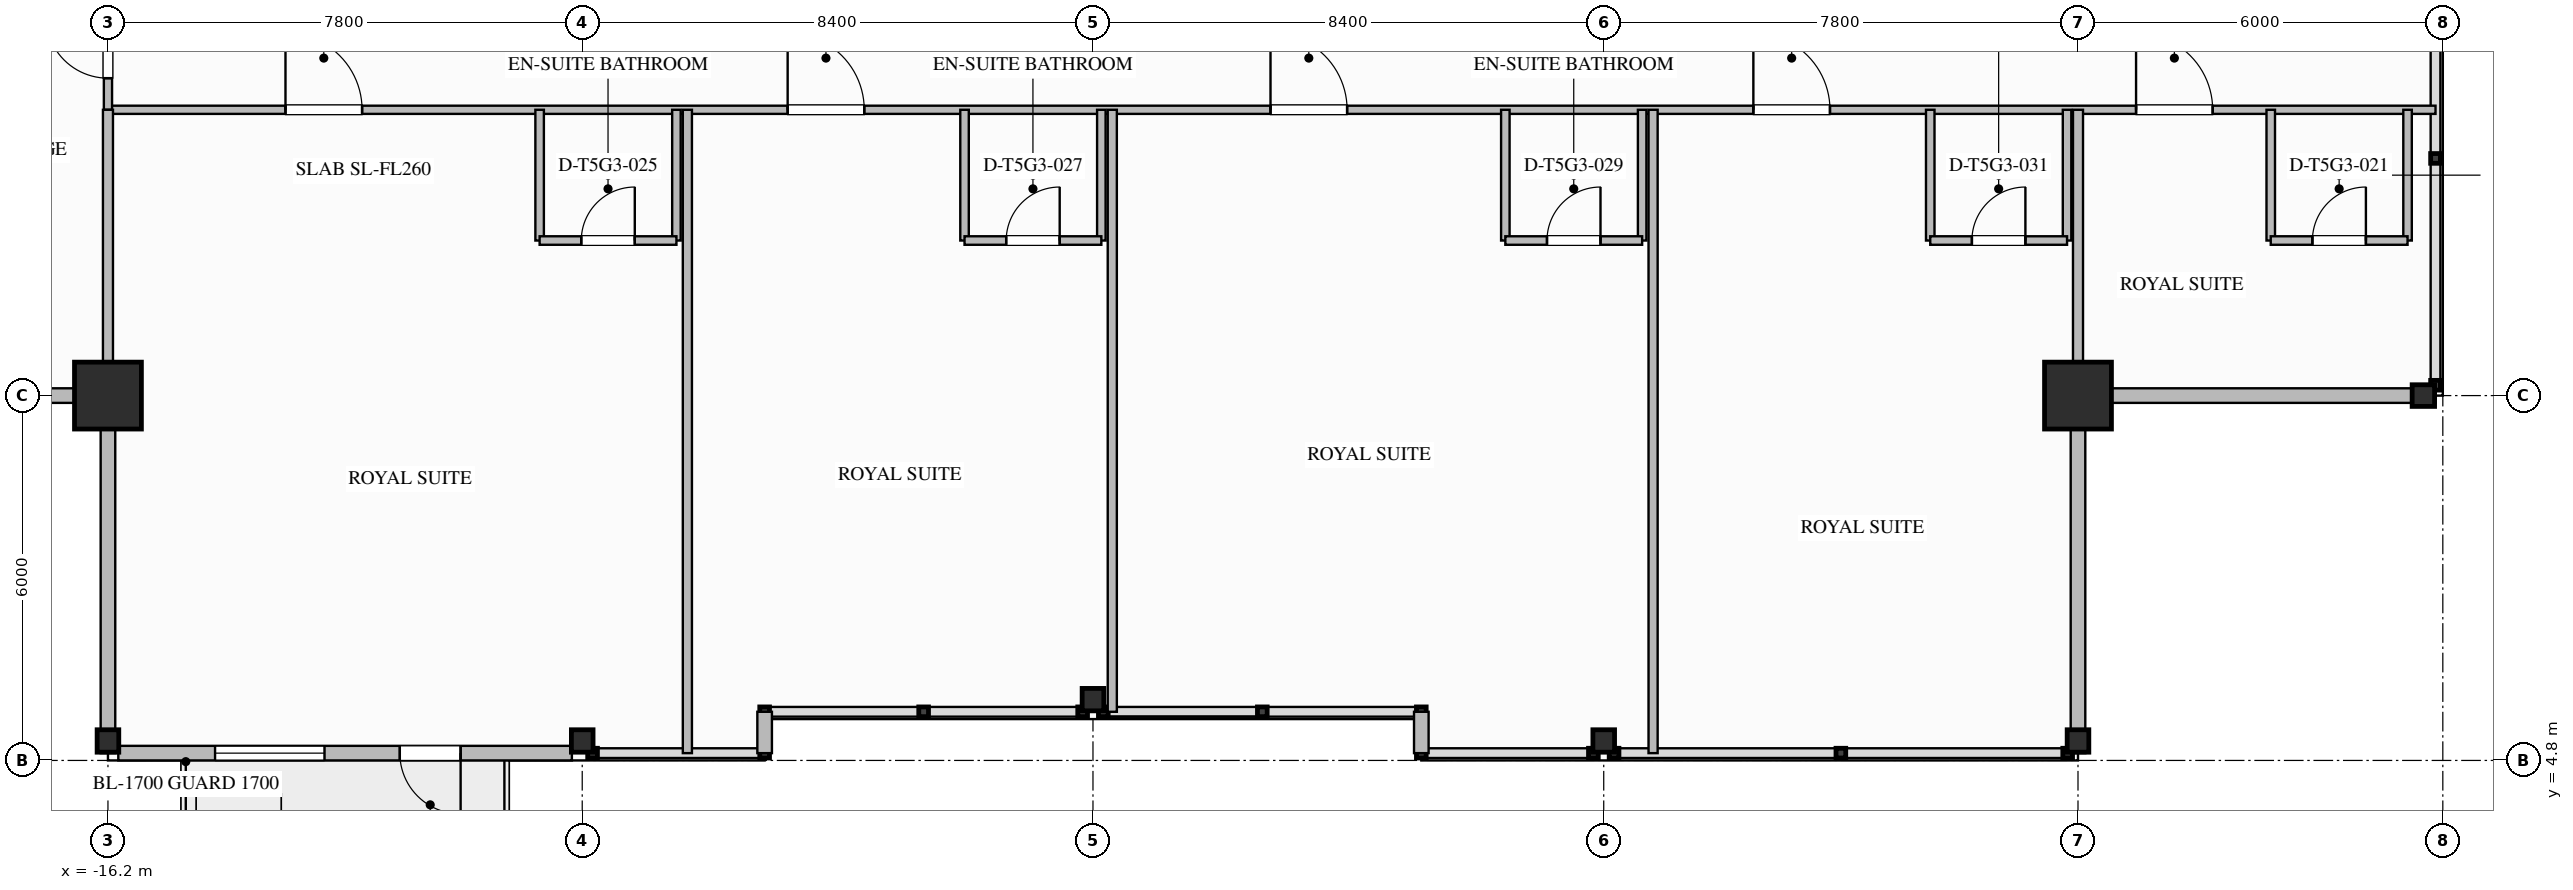
"""IFC4 building model, lengths in metres.
Left out: names, types, materials, properties, quantities, classifications, styles, units other than length and angle.
Written with IfcOpenShell. Run it as: python <this file> out.ifc"""

import sys

from ifc_helpers import new_model, si_unit, direction, frame, frame_2d, origin, origin_2d, place, context, subcontext, project, spatial, rectangle, i_section, extrude, element, fill, save


model = new_model("IFC4")
c1 = context("Model", 3, precision=1e-05, world=origin(), true_north=direction((0.0, 1.0)))
c2 = subcontext(c1, "Body", "Model", "MODEL_VIEW")
j1 = project(units=[si_unit("LENGTHUNIT", "METRE"), si_unit("PLANEANGLEUNIT", "RADIAN")], contexts=[c1])
p1 = place(None, origin())
s1 = spatial("IfcSite", under=j1, at=p1, CompositionType="ELEMENT")
p2 = place(p1, origin())
s2 = spatial("IfcBuilding", under=s1, at=p2, CompositionType="ELEMENT")
p3 = place(p2, frame((0.0, 0.0, 286.9)))
s3 = spatial("IfcBuildingStorey", under=s2, at=p3, CompositionType="ELEMENT", Elevation=286.9)
for number, where, z_axis, x_axis in (
    (1, (-16.2, 10.8, 0.0), (0.0, 0.0, 1.0), (1.0, 0.0, 0.0)),
    (2, (16.2, 10.8, 0.0), (0.0, 0.0, 1.0), (1.0, 0.0, 0.0)),
):
    element("IfcColumn", number, at=place(p3, frame(where, z_axis=z_axis, x_axis=x_axis)), inside=s3, PredefinedType="COLUMN", context=c2, shape_type="SweptSolid", body=[
        extrude(rectangle(XDim=1.1, YDim=1.1, at=origin_2d()), origin(), (0.0, 0.0, 1.0), 3.65),
    ])
for number, where, z_axis, x_axis in (
    (3, (21.88, 10.8, 0.0), (0.0, 0.0, 1.0), (1.0, 0.0, 0.0)),
    (4, (-16.2, 5.12, 0.0), (0.0, 0.0, 1.0), (0.0, 1.0, 0.0)),
    (5, (-8.4, 5.12, 0.0), (0.0, 0.0, 1.0), (0.0, 1.0, 0.0)),
    (6, (0.0, 5.8, 0.0), (0.0, 0.0, 1.0), (0.0, 1.0, 0.0)),
    (7, (8.4, 5.12, 0.0), (0.0, 0.0, 1.0), (0.0, 1.0, 0.0)),
    (8, (16.2, 5.12, 0.0), (0.0, 0.0, 1.0), (0.0, 1.0, 0.0)),
):
    element("IfcColumn", number, at=place(p3, frame(where, z_axis=z_axis, x_axis=x_axis)), inside=s3, PredefinedType="COLUMN", context=c2, shape_type="SweptSolid", body=[
        extrude(i_section(OverallWidth=0.369, OverallDepth=0.356, WebThickness=0.011, FlangeThickness=0.018, FilletRadius=0.025, at=origin_2d()), origin(), (0.0, 0.0, 1.0), 3.647),
    ])
p4 = place(p3, frame((-8.57, 4.92, 0.0), z_axis=(0.0, 0.0, 1.0), x_axis=(-1.0, 0.0, 0.0)))
e9 = element("IfcWall", 9, at=p4, inside=s3, PredefinedType="STANDARD", context=c2, shape_type="SweptSolid", body=[
    extrude(rectangle(XDim=7.46, YDim=0.24, at=frame_2d((3.73, 0.0))), origin(), (0.0, 0.0, 1.0), 2.854),
])
p5 = place(p4, frame((1.83, 0.0, 0.0)))
e10 = element("IfcOpeningElement", 10, at=p5, cuts=e9, PredefinedType="OPENING", context=c2, shape_type="SweptSolid", body=[
    extrude(rectangle(XDim=1.0, YDim=2.2, at=frame_2d((0.5, 1.1))), frame((0.0, 0.13, 0.0), z_axis=(0.0, -1.0, 0.0), x_axis=(1.0, 0.0, 0.0)), (0.0, 0.0, 1.0), 0.26),
])
p6 = place(p4, frame((4.068, 0.0, 0.75)))
e11 = element("IfcOpeningElement", 11, at=p6, cuts=e9, PredefinedType="OPENING", context=c2, shape_type="SweptSolid", body=[
    extrude(rectangle(XDim=1.8, YDim=2.003, at=frame_2d((0.9, 1.002))), frame((0.0, 0.13, 0.0), z_axis=(0.0, -1.0, 0.0), x_axis=(1.0, 0.0, 0.0)), (0.0, 0.0, 1.0), 0.26),
])
for number, where, z_axis, x_axis in (
    (12, (-16.2, 4.92, 0.0), (0.0, 0.0, 1.0), (0.0, 1.0, 0.0)),
    (13, (-16.2, 10.8, 0.0), (0.0, 0.0, 1.0), (-1.0, 0.0, 0.0)),
    (14, (22.08, 10.8, 0.0), (0.0, 0.0, 1.0), (-1.0, 0.0, 0.0)),
    (15, (16.2, 10.8, 0.0), (0.0, 0.0, 1.0), (0.0, -1.0, 0.0)),
):
    element("IfcWall", number, at=place(p3, frame(where, z_axis=z_axis, x_axis=x_axis)), inside=s3, PredefinedType="STANDARD", context=c2, shape_type="SweptSolid", body=[
        extrude(rectangle(XDim=5.88, YDim=0.24, at=frame_2d((2.94, 0.0))), origin(), (0.0, 0.0, 1.0), 2.779),
    ])
for number, where, z_axis, x_axis in (
    (16, (5.4, 4.92, 0.0), (0.0, 0.0, 1.0), (0.0, 1.0, 0.0)),
    (17, (-5.4, 5.6, 0.0), (0.0, 0.0, 1.0), (0.0, -1.0, 0.0)),
):
    element("IfcWall", number, at=place(p3, frame(where, z_axis=z_axis, x_axis=x_axis)), inside=s3, PredefinedType="STANDARD", context=c2, shape_type="SweptSolid", body=[
        extrude(rectangle(XDim=0.68, YDim=0.24, at=frame_2d((0.34, 0.0))), origin(), (0.0, 0.0, 1.0), 3.39),
    ])
p7 = place(p3, frame((-16.2, 15.5, 0.0), z_axis=(0.0, 0.0, 1.0), x_axis=(1.0, 0.0, 0.0)))
e18 = element("IfcWall", 18, at=p7, inside=s3, PredefinedType="PARTITIONING", context=c2, shape_type="SweptSolid", body=[
    extrude(rectangle(XDim=38.28, YDim=0.135, at=frame_2d((19.14, 0.0))), origin(), (0.0, 0.0, 1.0), 3.39),
])
p8 = place(p7, frame((33.355, 0.0, 0.0)))
e19 = element("IfcOpeningElement", 19, at=p8, cuts=e18, PredefinedType="OPENING", context=c2, shape_type="SweptSolid", body=[
    extrude(rectangle(XDim=1.26, YDim=2.2, at=frame_2d((0.63, 1.1))), frame((0.0, 0.077, 0.0), z_axis=(0.0, -1.0, 0.0), x_axis=(1.0, 0.0, 0.0)), (0.0, 0.0, 1.0), 0.155),
])
p9 = place(p7, frame((2.92, 0.0, 0.0)))
e20 = element("IfcOpeningElement", 20, at=p9, cuts=e18, PredefinedType="OPENING", context=c2, shape_type="SweptSolid", body=[
    extrude(rectangle(XDim=1.26, YDim=2.2, at=frame_2d((0.63, 1.1))), frame((0.0, 0.077, 0.0), z_axis=(0.0, -1.0, 0.0), x_axis=(1.0, 0.0, 0.0)), (0.0, 0.0, 1.0), 0.155),
])
p10 = place(p7, frame((11.178, 0.0, 0.0)))
e21 = element("IfcOpeningElement", 21, at=p10, cuts=e18, PredefinedType="OPENING", context=c2, shape_type="SweptSolid", body=[
    extrude(rectangle(XDim=1.26, YDim=2.2, at=frame_2d((0.63, 1.1))), frame((0.0, 0.077, 0.0), z_axis=(0.0, -1.0, 0.0), x_axis=(1.0, 0.0, 0.0)), (0.0, 0.0, 1.0), 0.155),
])
p11 = place(p7, frame((19.12, 0.0, 0.0)))
e22 = element("IfcOpeningElement", 22, at=p11, cuts=e18, PredefinedType="OPENING", context=c2, shape_type="SweptSolid", body=[
    extrude(rectangle(XDim=1.26, YDim=2.2, at=frame_2d((0.63, 1.1))), frame((0.0, 0.077, 0.0), z_axis=(0.0, -1.0, 0.0), x_axis=(1.0, 0.0, 0.0)), (0.0, 0.0, 1.0), 0.155),
])
p12 = place(p7, frame((27.061, 0.0, 0.0)))
e23 = element("IfcOpeningElement", 23, at=p12, cuts=e18, PredefinedType="OPENING", context=c2, shape_type="SweptSolid", body=[
    extrude(rectangle(XDim=1.26, YDim=2.2, at=frame_2d((0.63, 1.1))), frame((0.0, 0.077, 0.0), z_axis=(0.0, -1.0, 0.0), x_axis=(1.0, 0.0, 0.0)), (0.0, 0.0, 1.0), 0.155),
])
p13 = place(p3, frame((-16.2, 15.5, 0.0), z_axis=(0.0, 0.0, 1.0), x_axis=(0.0, 1.0, 0.0)))
e24 = element("IfcWall", 24, at=p13, inside=s3, PredefinedType="PARTITIONING", context=c2, shape_type="SweptSolid", body=[
    extrude(rectangle(XDim=2.9, YDim=0.135, at=frame_2d((1.45, 0.0))), origin(), (0.0, 0.0, 1.0), 2.764),
])
p14 = place(p13, frame((0.52, 0.0, 0.0)))
e25 = element("IfcOpeningElement", 25, at=p14, cuts=e24, PredefinedType="OPENING", context=c2, shape_type="SweptSolid", body=[
    extrude(rectangle(XDim=1.02, YDim=2.15, at=frame_2d((0.51, 1.075))), frame((0.0, 0.077, 0.0), z_axis=(0.0, -1.0, 0.0), x_axis=(1.0, 0.0, 0.0)), (0.0, 0.0, 1.0), 0.155),
])
for number, where, z_axis, x_axis in (
    (26, (-16.2, 10.92, 0.0), (0.0, 0.0, 1.0), (0.0, 1.0, 0.0)),
    (27, (16.2, 10.92, 0.0), (0.0, 0.0, 1.0), (0.0, 1.0, 0.0)),
):
    element("IfcWall", number, at=place(p3, frame(where, z_axis=z_axis, x_axis=x_axis)), inside=s3, PredefinedType="PARTITIONING", context=c2, shape_type="SweptSolid", body=[
        extrude(rectangle(XDim=4.58, YDim=0.165, at=frame_2d((2.29, 0.0))), origin(), (0.0, 0.0, 1.0), 2.764),
    ])
for number, where, z_axis, x_axis in (
    (28, (19.37, 15.5, 0.0), (0.0, 0.0, 1.0), (0.0, -1.0, 0.0)),
    (29, (21.62, 15.5, 0.0), (0.0, 0.0, 1.0), (0.0, -1.0, 0.0)),
):
    element("IfcWall", number, at=place(p3, frame(where, z_axis=z_axis, x_axis=x_axis)), inside=s3, PredefinedType="PLUMBINGWALL", context=c2, shape_type="SweptSolid", body=[
        extrude(rectangle(XDim=2.15, YDim=0.14, at=frame_2d((1.075, 0.0))), origin(), (0.0, 0.0, 1.0), 3.39),
    ])
p15 = place(p3, frame((19.37, 13.35, 0.0), z_axis=(0.0, 0.0, 1.0), x_axis=(1.0, 0.0, 0.0)))
e30 = element("IfcWall", 30, at=p15, inside=s3, PredefinedType="PLUMBINGWALL", context=c2, shape_type="SweptSolid", body=[
    extrude(rectangle(XDim=2.25, YDim=0.14, at=frame_2d((1.125, 0.0))), origin(), (0.0, 0.0, 1.0), 3.39),
])
p16 = place(p15, frame((0.685, 0.0, 0.0)))
e31 = element("IfcOpeningElement", 31, at=p16, cuts=e30, PredefinedType="OPENING", context=c2, shape_type="SweptSolid", body=[
    extrude(rectangle(XDim=0.88, YDim=2.1, at=frame_2d((0.44, 1.05))), frame((0.0, 0.08, 0.0), z_axis=(0.0, -1.0, 0.0), x_axis=(1.0, 0.0, 0.0)), (0.0, 0.0, 1.0), 0.16),
])
for number, where, z_axis, x_axis in (
    (32, (-9.101, 15.5, 0.0), (0.0, 0.0, 1.0), (0.0, -1.0, 0.0)),
    (33, (-6.851, 15.5, 0.0), (0.0, 0.0, 1.0), (0.0, -1.0, 0.0)),
):
    element("IfcWall", number, at=place(p3, frame(where, z_axis=z_axis, x_axis=x_axis)), inside=s3, PredefinedType="PLUMBINGWALL", context=c2, shape_type="SweptSolid", body=[
        extrude(rectangle(XDim=2.15, YDim=0.14, at=frame_2d((1.075, 0.0))), origin(), (0.0, 0.0, 1.0), 3.39),
    ])
p17 = place(p3, frame((-9.101, 13.35, 0.0), z_axis=(0.0, 0.0, 1.0), x_axis=(1.0, 0.0, 0.0)))
e34 = element("IfcWall", 34, at=p17, inside=s3, PredefinedType="PLUMBINGWALL", context=c2, shape_type="SweptSolid", body=[
    extrude(rectangle(XDim=2.25, YDim=0.14, at=frame_2d((1.125, 0.0))), origin(), (0.0, 0.0, 1.0), 3.39),
])
p18 = place(p17, frame((0.685, 0.0, 0.0)))
e35 = element("IfcOpeningElement", 35, at=p18, cuts=e34, PredefinedType="OPENING", context=c2, shape_type="SweptSolid", body=[
    extrude(rectangle(XDim=0.88, YDim=2.1, at=frame_2d((0.44, 1.05))), frame((0.0, 0.08, 0.0), z_axis=(0.0, -1.0, 0.0), x_axis=(1.0, 0.0, 0.0)), (0.0, 0.0, 1.0), 0.16),
])
p19 = place(p3, frame((-6.671, 4.92, 0.0), z_axis=(0.0, 0.0, 1.0), x_axis=(0.0, 1.0, 0.0)))
e36 = element("IfcWall", 36, at=p19, inside=s3, PredefinedType="PARTITIONING", context=c2, shape_type="SweptSolid", body=[
    extrude(rectangle(XDim=10.58, YDim=0.15, at=frame_2d((5.29, 0.0))), origin(), (0.0, 0.0, 1.0), 3.39),
])
p20 = place(p3, frame((-2.112, 15.5, 0.0), z_axis=(0.0, 0.0, 1.0), x_axis=(0.0, -1.0, 0.0)))
e37 = element("IfcWall", 37, at=p20, inside=s3, PredefinedType="PLUMBINGWALL", context=c2, shape_type="SweptSolid", body=[
    extrude(rectangle(XDim=2.15, YDim=0.14, at=frame_2d((1.075, 0.0))), origin(), (0.0, 0.0, 1.0), 3.39),
])
p21 = place(p3, frame((0.138, 15.5, 0.0), z_axis=(0.0, 0.0, 1.0), x_axis=(0.0, -1.0, 0.0)))
e38 = element("IfcWall", 38, at=p21, inside=s3, PredefinedType="PLUMBINGWALL", context=c2, shape_type="SweptSolid", body=[
    extrude(rectangle(XDim=2.15, YDim=0.14, at=frame_2d((1.075, 0.0))), origin(), (0.0, 0.0, 1.0), 2.768),
])
p22 = place(p3, frame((-2.112, 13.35, 0.0), z_axis=(0.0, 0.0, 1.0), x_axis=(1.0, 0.0, 0.0)))
e39 = element("IfcWall", 39, at=p22, inside=s3, PredefinedType="PLUMBINGWALL", context=c2, shape_type="SweptSolid", body=[
    extrude(rectangle(XDim=2.25, YDim=0.14, at=frame_2d((1.125, 0.0))), origin(), (0.0, 0.0, 1.0), 3.39),
])
p23 = place(p22, frame((0.685, 0.0, 0.0)))
e40 = element("IfcOpeningElement", 40, at=p23, cuts=e39, PredefinedType="OPENING", context=c2, shape_type="SweptSolid", body=[
    extrude(rectangle(XDim=0.88, YDim=2.1, at=frame_2d((0.44, 1.05))), frame((0.0, 0.08, 0.0), z_axis=(0.0, -1.0, 0.0), x_axis=(1.0, 0.0, 0.0)), (0.0, 0.0, 1.0), 0.16),
])
p24 = place(p3, frame((0.318, 5.6, 0.0), z_axis=(0.0, 0.0, 1.0), x_axis=(0.0, 1.0, 0.0)))
e41 = element("IfcWall", 41, at=p24, inside=s3, PredefinedType="PARTITIONING", context=c2, shape_type="SweptSolid", body=[
    extrude(rectangle(XDim=9.9, YDim=0.15, at=frame_2d((4.95, 0.0))), origin(), (0.0, 0.0, 1.0), 3.39),
])
for number, where, z_axis, x_axis in (
    (42, (6.782, 15.5, 0.0), (0.0, 0.0, 1.0), (0.0, -1.0, 0.0)),
    (43, (9.032, 15.5, 0.0), (0.0, 0.0, 1.0), (0.0, -1.0, 0.0)),
):
    element("IfcWall", number, at=place(p3, frame(where, z_axis=z_axis, x_axis=x_axis)), inside=s3, PredefinedType="PLUMBINGWALL", context=c2, shape_type="SweptSolid", body=[
        extrude(rectangle(XDim=2.15, YDim=0.14, at=frame_2d((1.075, 0.0))), origin(), (0.0, 0.0, 1.0), 3.39),
    ])
p25 = place(p3, frame((6.782, 13.35, 0.0), z_axis=(0.0, 0.0, 1.0), x_axis=(1.0, 0.0, 0.0)))
e44 = element("IfcWall", 44, at=p25, inside=s3, PredefinedType="PLUMBINGWALL", context=c2, shape_type="SweptSolid", body=[
    extrude(rectangle(XDim=2.25, YDim=0.14, at=frame_2d((1.125, 0.0))), origin(), (0.0, 0.0, 1.0), 3.39),
])
p26 = place(p25, frame((0.685, 0.0, 0.0)))
e45 = element("IfcOpeningElement", 45, at=p26, cuts=e44, PredefinedType="OPENING", context=c2, shape_type="SweptSolid", body=[
    extrude(rectangle(XDim=0.88, YDim=2.1, at=frame_2d((0.44, 1.05))), frame((0.0, 0.08, 0.0), z_axis=(0.0, -1.0, 0.0), x_axis=(1.0, 0.0, 0.0)), (0.0, 0.0, 1.0), 0.16),
])
p27 = place(p3, frame((9.212, 4.92, 0.0), z_axis=(0.0, 0.0, 1.0), x_axis=(0.0, 1.0, 0.0)))
e46 = element("IfcWall", 46, at=p27, inside=s3, PredefinedType="PARTITIONING", context=c2, shape_type="SweptSolid", body=[
    extrude(rectangle(XDim=10.58, YDim=0.15, at=frame_2d((5.29, 0.0))), origin(), (0.0, 0.0, 1.0), 3.39),
])
p28 = place(p3, frame((13.77, 15.5, 0.0), z_axis=(0.0, 0.0, 1.0), x_axis=(0.0, -1.0, 0.0)))
e47 = element("IfcWall", 47, at=p28, inside=s3, PredefinedType="PLUMBINGWALL", context=c2, shape_type="SweptSolid", body=[
    extrude(rectangle(XDim=2.15, YDim=0.14, at=frame_2d((1.075, 0.0))), origin(), (0.0, 0.0, 1.0), 3.39),
])
p29 = place(p3, frame((16.02, 15.5, 0.0), z_axis=(0.0, 0.0, 1.0), x_axis=(0.0, -1.0, 0.0)))
e48 = element("IfcWall", 48, at=p29, inside=s3, PredefinedType="PLUMBINGWALL", context=c2, shape_type="SweptSolid", body=[
    extrude(rectangle(XDim=2.15, YDim=0.14, at=frame_2d((1.075, 0.0))), origin(), (0.0, 0.0, 1.0), 2.764),
])
p30 = place(p3, frame((13.77, 13.35, 0.0), z_axis=(0.0, 0.0, 1.0), x_axis=(1.0, 0.0, 0.0)))
e49 = element("IfcWall", 49, at=p30, inside=s3, PredefinedType="PLUMBINGWALL", context=c2, shape_type="SweptSolid", body=[
    extrude(rectangle(XDim=2.25, YDim=0.14, at=frame_2d((1.125, 0.0))), origin(), (0.0, 0.0, 1.0), 3.39),
])
p31 = place(p30, frame((0.685, 0.0, 0.0)))
e50 = element("IfcOpeningElement", 50, at=p31, cuts=e49, PredefinedType="OPENING", context=c2, shape_type="SweptSolid", body=[
    extrude(rectangle(XDim=0.88, YDim=2.1, at=frame_2d((0.44, 1.05))), frame((0.0, 0.08, 0.0), z_axis=(0.0, -1.0, 0.0), x_axis=(1.0, 0.0, 0.0)), (0.0, 0.0, 1.0), 0.16),
])
p32 = place(p5, origin())
e51 = element("IfcDoor", 51, at=p32, inside=s3, OperationType="SINGLE_SWING_LEFT", PredefinedType="DOOR", context=c2, shape_type="SweptSolid", body=[
    extrude(rectangle(XDim=1.0, YDim=2.2, at=frame_2d((0.5, 1.1))), frame((0.0, 0.025, 0.0), z_axis=(0.0, -1.0, 0.0), x_axis=(1.0, 0.0, 0.0)), (0.0, 0.0, 1.0), 0.05),
])
fill(e10, e51)
p33 = place(p6, origin())
e52 = element("IfcWindow", 52, at=p33, inside=s3, PartitioningType="SINGLE_PANEL", PredefinedType="WINDOW", context=c2, shape_type="SweptSolid", body=[
    extrude(rectangle(XDim=1.8, YDim=2.003, at=frame_2d((0.9, 1.002))), frame((0.0, 0.03, 0.0), z_axis=(0.0, -1.0, 0.0), x_axis=(1.0, 0.0, 0.0)), (0.0, 0.0, 1.0), 0.06),
])
fill(e11, e52)
p34 = place(p14, origin())
e53 = element("IfcDoor", 53, at=p34, inside=s3, OperationType="SINGLE_SWING_RIGHT", PredefinedType="DOOR", context=c2, shape_type="SweptSolid", body=[
    extrude(rectangle(XDim=1.02, YDim=2.15, at=frame_2d((0.51, 1.075))), frame((0.0, 0.025, 0.0), z_axis=(0.0, -1.0, 0.0), x_axis=(1.0, 0.0, 0.0)), (0.0, 0.0, 1.0), 0.05),
])
fill(e25, e53)
p35 = place(p16, origin())
e54 = element("IfcDoor", 54, at=p35, inside=s3, OperationType="SINGLE_SWING_RIGHT", PredefinedType="DOOR", context=c2, shape_type="SweptSolid", body=[
    extrude(rectangle(XDim=0.88, YDim=2.1, at=frame_2d((0.44, 1.05))), frame((0.0, 0.025, 0.0), z_axis=(0.0, -1.0, 0.0), x_axis=(1.0, 0.0, 0.0)), (0.0, 0.0, 1.0), 0.05),
])
fill(e31, e54)
p36 = place(p8, origin())
e55 = element("IfcDoor", 55, at=p36, inside=s3, OperationType="SINGLE_SWING_LEFT", PredefinedType="DOOR", context=c2, shape_type="SweptSolid", body=[
    extrude(rectangle(XDim=1.26, YDim=2.2, at=frame_2d((0.63, 1.1))), frame((0.0, 0.025, 0.0), z_axis=(0.0, -1.0, 0.0), x_axis=(1.0, 0.0, 0.0)), (0.0, 0.0, 1.0), 0.05),
])
fill(e19, e55)
p37 = place(p18, origin())
e56 = element("IfcDoor", 56, at=p37, inside=s3, OperationType="SINGLE_SWING_RIGHT", PredefinedType="DOOR", context=c2, shape_type="SweptSolid", body=[
    extrude(rectangle(XDim=0.88, YDim=2.1, at=frame_2d((0.44, 1.05))), frame((0.0, 0.025, 0.0), z_axis=(0.0, -1.0, 0.0), x_axis=(1.0, 0.0, 0.0)), (0.0, 0.0, 1.0), 0.05),
])
fill(e35, e56)
p38 = place(p9, origin())
e57 = element("IfcDoor", 57, at=p38, inside=s3, OperationType="SINGLE_SWING_LEFT", PredefinedType="DOOR", context=c2, shape_type="SweptSolid", body=[
    extrude(rectangle(XDim=1.26, YDim=2.2, at=frame_2d((0.63, 1.1))), frame((0.0, 0.025, 0.0), z_axis=(0.0, -1.0, 0.0), x_axis=(1.0, 0.0, 0.0)), (0.0, 0.0, 1.0), 0.05),
])
fill(e20, e57)
p39 = place(p23, origin())
e58 = element("IfcDoor", 58, at=p39, inside=s3, OperationType="SINGLE_SWING_RIGHT", PredefinedType="DOOR", context=c2, shape_type="SweptSolid", body=[
    extrude(rectangle(XDim=0.88, YDim=2.1, at=frame_2d((0.44, 1.05))), frame((0.0, 0.025, 0.0), z_axis=(0.0, -1.0, 0.0), x_axis=(1.0, 0.0, 0.0)), (0.0, 0.0, 1.0), 0.05),
])
fill(e40, e58)
p40 = place(p10, origin())
e59 = element("IfcDoor", 59, at=p40, inside=s3, OperationType="SINGLE_SWING_LEFT", PredefinedType="DOOR", context=c2, shape_type="SweptSolid", body=[
    extrude(rectangle(XDim=1.26, YDim=2.2, at=frame_2d((0.63, 1.1))), frame((0.0, 0.025, 0.0), z_axis=(0.0, -1.0, 0.0), x_axis=(1.0, 0.0, 0.0)), (0.0, 0.0, 1.0), 0.05),
])
fill(e21, e59)
p41 = place(p26, origin())
e60 = element("IfcDoor", 60, at=p41, inside=s3, OperationType="SINGLE_SWING_RIGHT", PredefinedType="DOOR", context=c2, shape_type="SweptSolid", body=[
    extrude(rectangle(XDim=0.88, YDim=2.1, at=frame_2d((0.44, 1.05))), frame((0.0, 0.025, 0.0), z_axis=(0.0, -1.0, 0.0), x_axis=(1.0, 0.0, 0.0)), (0.0, 0.0, 1.0), 0.05),
])
fill(e45, e60)
p42 = place(p11, origin())
e61 = element("IfcDoor", 61, at=p42, inside=s3, OperationType="SINGLE_SWING_LEFT", PredefinedType="DOOR", context=c2, shape_type="SweptSolid", body=[
    extrude(rectangle(XDim=1.26, YDim=2.2, at=frame_2d((0.63, 1.1))), frame((0.0, 0.025, 0.0), z_axis=(0.0, -1.0, 0.0), x_axis=(1.0, 0.0, 0.0)), (0.0, 0.0, 1.0), 0.05),
])
fill(e22, e61)
p43 = place(p31, origin())
e62 = element("IfcDoor", 62, at=p43, inside=s3, OperationType="SINGLE_SWING_RIGHT", PredefinedType="DOOR", context=c2, shape_type="SweptSolid", body=[
    extrude(rectangle(XDim=0.88, YDim=2.1, at=frame_2d((0.44, 1.05))), frame((0.0, 0.025, 0.0), z_axis=(0.0, -1.0, 0.0), x_axis=(1.0, 0.0, 0.0)), (0.0, 0.0, 1.0), 0.05),
])
fill(e50, e62)
p44 = place(p12, origin())
e63 = element("IfcDoor", 63, at=p44, inside=s3, OperationType="SINGLE_SWING_LEFT", PredefinedType="DOOR", context=c2, shape_type="SweptSolid", body=[
    extrude(rectangle(XDim=1.26, YDim=2.2, at=frame_2d((0.63, 1.1))), frame((0.0, 0.025, 0.0), z_axis=(0.0, -1.0, 0.0), x_axis=(1.0, 0.0, 0.0)), (0.0, 0.0, 1.0), 0.05),
])
fill(e23, e63)
save(model, sys.argv[1])
